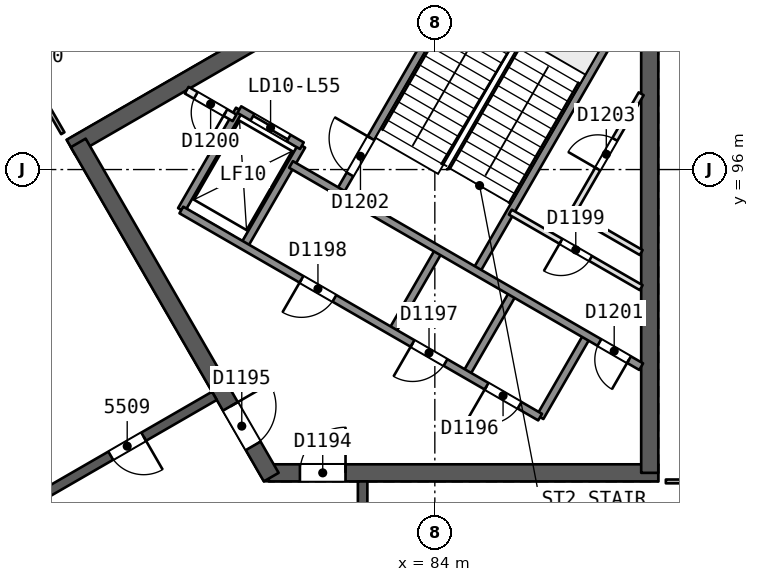
"""IFC4 building model, lengths in metres.
Left out: names, types, materials, properties, quantities, classifications, styles, units other than length and angle.
Written with IfcOpenShell. Run it as: python <this file> out.ifc"""

import sys

from ifc_helpers import new_model, si_unit, direction, frame, frame_2d, origin, place, context, subcontext, project, spatial, rectangle, extrude, element, fill, save


model = new_model("IFC4")
c1 = context("Model", 3, precision=1e-05, world=origin(), true_north=direction((0.0, 1.0)))
c2 = subcontext(c1, "Body", "Model", "MODEL_VIEW")
j1 = project(units=[si_unit("LENGTHUNIT", "METRE"), si_unit("PLANEANGLEUNIT", "RADIAN")], contexts=[c1])
p1 = place(None, origin())
s1 = spatial("IfcSite", under=j1, at=p1, CompositionType="ELEMENT")
p2 = place(p1, origin())
s2 = spatial("IfcBuilding", under=s1, at=p2, CompositionType="ELEMENT")
p3 = place(p2, frame((0.0, 0.0, 224.3)))
s3 = spatial("IfcBuildingStorey", under=s2, at=p3, CompositionType="ELEMENT", Elevation=224.3)
p4 = place(p3, frame((79.63, 88.019, 0.0), z_axis=(0.0, 0.0, 1.0), x_axis=(1.0, 0.0, 0.0)))
e1 = element("IfcWall", 1, at=p4, inside=s3, PredefinedType="SHEAR", context=c2, shape_type="SweptSolid", body=[
    extrude(rectangle(XDim=10.25, YDim=0.45, at=frame_2d((5.125, 0.0))), origin(), (0.0, 0.0, 1.0), 3.7),
])
p5 = place(p4, frame((0.82, 0.0, 0.0)))
e2 = element("IfcOpeningElement", 2, at=p5, cuts=e1, PredefinedType="OPENING", context=c2, shape_type="SweptSolid", body=[
    extrude(rectangle(XDim=1.2, YDim=2.1, at=frame_2d((0.6, 1.05))), frame((0.0, 0.235, 0.0), z_axis=(0.0, -1.0, 0.0), x_axis=(1.0, 0.0, 0.0)), (0.0, 0.0, 1.0), 0.471),
])
p6 = place(p3, frame((89.655, 88.019, 0.0), z_axis=(0.0, 0.0, 1.0), x_axis=(0.0, 1.0, 0.0)))
e3 = element("IfcWall", 3, at=p6, inside=s3, PredefinedType="SHEAR", context=c2, shape_type="SweptSolid", body=[
    extrude(rectangle(XDim=14.108, YDim=0.45, at=frame_2d((7.054, 0.0))), origin(), (0.0, 0.0, 1.0), 3.7),
])
p7 = place(p3, frame((86.723, 103.69, 0.0), z_axis=(0.0, 0.0, 1.0), x_axis=(-0.866022713978, -0.500004658852, 0.0)))
e4 = element("IfcWall", 4, at=p7, inside=s3, PredefinedType="SHEAR", context=c2, shape_type="SweptSolid", body=[
    extrude(rectangle(XDim=14.203, YDim=0.45, at=frame_2d((7.102, 0.0))), origin(), (0.0, 0.0, 1.0), 3.7),
])
p8 = place(p3, frame((74.617, 96.701, 0.0), z_axis=(0.0, 0.0, 1.0), x_axis=(0.499994385119, -0.866028645513, 0.0)))
e5 = element("IfcWall", 5, at=p8, inside=s3, PredefinedType="SHEAR", context=c2, shape_type="SweptSolid", body=[
    extrude(rectangle(XDim=10.155, YDim=0.45, at=frame_2d((5.077, 0.0))), origin(), (0.0, 0.0, 1.0), 3.7),
])
p9 = place(p8, frame((8.005, 0.0, 0.0)))
e6 = element("IfcOpeningElement", 6, at=p9, cuts=e5, PredefinedType="OPENING", context=c2, shape_type="SweptSolid", body=[
    extrude(rectangle(XDim=1.2, YDim=2.1, at=frame_2d((0.6, 1.05))), frame((0.0, 0.235, 0.0), z_axis=(0.0, -1.0, 0.0), x_axis=(1.0, 0.0, 0.0)), (0.0, 0.0, 1.0), 0.471),
])
p10 = place(p3, frame((82.1, 72.206, 0.0), z_axis=(0.0, 0.0, 1.0), x_axis=(0.0, 1.0, 0.0)))
e7 = element("IfcWall", 7, at=p10, inside=s3, PredefinedType="SHEAR", context=c2, shape_type="SweptSolid", body=[
    extrude(rectangle(XDim=15.588, YDim=0.25, at=frame_2d((7.794, 0.0))), origin(), (0.0, 0.0, 1.0), 3.3),
])
p11 = place(p10, frame((2.15, 0.0, 0.0)))
e8 = element("IfcOpeningElement", 8, at=p11, cuts=e7, PredefinedType="OPENING", context=c2, shape_type="SweptSolid", body=[
    extrude(rectangle(XDim=1.0, YDim=2.1, at=frame_2d((0.5, 1.05))), frame((0.0, 0.135, 0.0), z_axis=(0.0, -1.0, 0.0), x_axis=(1.0, 0.0, 0.0)), (0.0, 0.0, 1.0), 0.271),
])
p12 = place(p10, frame((8.75, 0.0, 0.0)))
e9 = element("IfcOpeningElement", 9, at=p12, cuts=e7, PredefinedType="OPENING", context=c2, shape_type="SweptSolid", body=[
    extrude(rectangle(XDim=1.0, YDim=2.1, at=frame_2d((0.5, 1.05))), frame((0.0, 0.135, 0.0), z_axis=(0.0, -1.0, 0.0), x_axis=(1.0, 0.0, 0.0)), (0.0, 0.0, 1.0), 0.271),
])
p13 = place(p10, frame((12.594, 0.0, 0.0)))
e10 = element("IfcOpeningElement", 10, at=p13, cuts=e7, PredefinedType="OPENING", context=c2, shape_type="SweptSolid", body=[
    extrude(rectangle(XDim=1.0, YDim=2.1, at=frame_2d((0.5, 1.05))), frame((0.0, 0.135, 0.0), z_axis=(0.0, -1.0, 0.0), x_axis=(1.0, 0.0, 0.0)), (0.0, 0.0, 1.0), 0.271),
])
p14 = place(p3, frame((78.2, 90.046, 0.0), z_axis=(0.0, 0.0, 1.0), x_axis=(-0.866026492143, -0.499998114903, 0.0)))
e11 = element("IfcWall", 11, at=p14, inside=s3, PredefinedType="SHEAR", context=c2, shape_type="SweptSolid", body=[
    extrude(rectangle(XDim=15.588, YDim=0.25, at=frame_2d((7.794, 0.0))), origin(), (0.0, 0.0, 1.0), 3.3),
])
p15 = place(p14, frame((2.15, 0.0, 0.0)))
e12 = element("IfcOpeningElement", 12, at=p15, cuts=e11, PredefinedType="OPENING", context=c2, shape_type="SweptSolid", body=[
    extrude(rectangle(XDim=1.0, YDim=2.1, at=frame_2d((0.5, 1.05))), frame((0.0, 0.135, 0.0), z_axis=(0.0, -1.0, 0.0), x_axis=(1.0, 0.0, 0.0)), (0.0, 0.0, 1.0), 0.271),
])
p16 = place(p14, frame((8.538, 0.0, 0.0)))
e13 = element("IfcOpeningElement", 13, at=p16, cuts=e11, PredefinedType="OPENING", context=c2, shape_type="SweptSolid", body=[
    extrude(rectangle(XDim=1.1, YDim=2.1, at=frame_2d((0.55, 1.05))), frame((0.0, 0.135, 0.0), z_axis=(0.0, -1.0, 0.0), x_axis=(1.0, 0.0, 0.0)), (0.0, 0.0, 1.0), 0.271),
])
p17 = place(p14, frame((12.282, 0.0, 0.0)))
e14 = element("IfcOpeningElement", 14, at=p17, cuts=e11, PredefinedType="OPENING", context=c2, shape_type="SweptSolid", body=[
    extrude(rectangle(XDim=1.0, YDim=2.1, at=frame_2d((0.5, 1.05))), frame((0.0, 0.135, 0.0), z_axis=(0.0, -1.0, 0.0), x_axis=(1.0, 0.0, 0.0)), (0.0, 0.0, 1.0), 0.271),
])
p18 = place(p3, frame((92.428, 87.794, 0.0), z_axis=(0.0, 0.0, 1.0), x_axis=(-1.0, 0.0, 0.0)))
e15 = element("IfcWall", 15, at=p18, inside=s3, PredefinedType="PARTITIONING", context=c2, shape_type="SweptSolid", body=[
    extrude(rectangle(XDim=2.349, YDim=0.1, at=frame_2d((1.175, 0.0))), origin(), (0.0, 0.0, 1.0), 3.3),
])
p19 = place(p18, frame((0.725, 0.0, 0.0)))
e16 = element("IfcOpeningElement", 16, at=p19, cuts=e15, PredefinedType="OPENING", context=c2, shape_type="SweptSolid", body=[
    extrude(rectangle(XDim=0.9, YDim=2.1, at=frame_2d((0.45, 1.05))), frame((0.0, 0.061, 0.0), z_axis=(0.0, -1.0, 0.0), x_axis=(1.0, 0.0, 0.0)), (0.0, 0.0, 1.0), 0.121),
])
p20 = place(p3, frame((74.21, 96.956, 0.0), z_axis=(0.0, 0.0, 1.0), x_axis=(-0.499950341091, 0.86605407247, 0.0)))
e17 = element("IfcWall", 17, at=p20, inside=s3, PredefinedType="PARTITIONING", context=c2, shape_type="SweptSolid", body=[
    extrude(rectangle(XDim=2.349, YDim=0.1, at=frame_2d((1.175, 0.0))), origin(), (0.0, 0.0, 1.0), 3.3),
])
p21 = place(p20, frame((0.725, 0.0, 0.0)))
e18 = element("IfcOpeningElement", 18, at=p21, cuts=e17, PredefinedType="OPENING", context=c2, shape_type="SweptSolid", body=[
    extrude(rectangle(XDim=0.9, YDim=2.1, at=frame_2d((0.45, 1.05))), frame((0.0, 0.061, 0.0), z_axis=(0.0, -1.0, 0.0), x_axis=(1.0, 0.0, 0.0)), (0.0, 0.0, 1.0), 0.121),
])
p22 = place(p3, frame((44.324, 82.585, 0.0), z_axis=(0.0, 0.0, 1.0), x_axis=(0.86602584856, 0.499999229625, 0.0)))
e19 = element("IfcWall", 19, at=p22, inside=s3, PredefinedType="SOLIDWALL", context=c2, shape_type="SweptSolid", body=[
    extrude(rectangle(XDim=50.547, YDim=0.3, at=frame_2d((25.274, 0.0))), origin(), (0.0, 0.0, 1.0), 3.3),
])
p23 = place(p22, frame((24.23, 0.0, 0.0)))
e20 = element("IfcOpeningElement", 20, at=p23, cuts=e19, PredefinedType="OPENING", context=c2, shape_type="SweptSolid", body=[
    extrude(rectangle(XDim=2.4, YDim=2.4, at=frame_2d((1.2, 1.2))), frame((0.0, 0.161, 0.0), z_axis=(0.0, -1.0, 0.0), x_axis=(1.0, 0.0, 0.0)), (0.0, 0.0, 1.0), 0.321),
])
p24 = place(p22, frame((29.218, 0.0, 0.0)))
e21 = element("IfcOpeningElement", 21, at=p24, cuts=e19, PredefinedType="OPENING", context=c2, shape_type="SweptSolid", body=[
    extrude(rectangle(XDim=2.4, YDim=2.4, at=frame_2d((1.2, 1.2))), frame((0.0, 0.161, 0.0), z_axis=(0.0, -1.0, 0.0), x_axis=(1.0, 0.0, 0.0)), (0.0, 0.0, 1.0), 0.321),
])
p25 = place(p22, frame((39.328, 0.0, 0.0)))
e22 = element("IfcOpeningElement", 22, at=p25, cuts=e19, PredefinedType="OPENING", context=c2, shape_type="SweptSolid", body=[
    extrude(rectangle(XDim=2.4, YDim=2.4, at=frame_2d((1.2, 1.2))), frame((0.0, 0.161, 0.0), z_axis=(0.0, -1.0, 0.0), x_axis=(1.0, 0.0, 0.0)), (0.0, 0.0, 1.0), 0.321),
])
p26 = place(p22, frame((19.085, 0.0, 0.0)))
e23 = element("IfcOpeningElement", 23, at=p26, cuts=e19, PredefinedType="OPENING", context=c2, shape_type="SweptSolid", body=[
    extrude(rectangle(XDim=2.4, YDim=2.4, at=frame_2d((1.2, 1.2))), frame((0.0, 0.161, 0.0), z_axis=(0.0, -1.0, 0.0), x_axis=(1.0, 0.0, 0.0)), (0.0, 0.0, 1.0), 0.321),
])
p27 = place(p22, frame((8.771, 0.0, 0.0)))
e24 = element("IfcOpeningElement", 24, at=p27, cuts=e19, PredefinedType="OPENING", context=c2, shape_type="SweptSolid", body=[
    extrude(rectangle(XDim=2.4, YDim=2.4, at=frame_2d((1.2, 1.2))), frame((0.0, 0.161, 0.0), z_axis=(0.0, -1.0, 0.0), x_axis=(1.0, 0.0, 0.0)), (0.0, 0.0, 1.0), 0.321),
])
p28 = place(p3, frame((86.77, 89.486, 0.0), z_axis=(0.0, 0.0, 1.0), x_axis=(0.499961042966, 0.86604789447, 0.0)))
e25 = element("IfcWall", 25, at=p28, inside=s3, PredefinedType="SOLIDWALL", context=c2, shape_type="SweptSolid", body=[
    extrude(rectangle(XDim=2.48, YDim=0.2, at=frame_2d((1.24, 0.0))), origin(), (0.0, 0.0, 1.0), 3.3),
])
p29 = place(p3, frame((87.621, 94.86, 0.0), z_axis=(0.0, 0.0, 1.0), x_axis=(0.499993116331, 0.866029378036, 0.0)))
e26 = element("IfcWall", 26, at=p29, inside=s3, PredefinedType="PARTITIONING", context=c2, shape_type="SweptSolid", body=[
    extrude(rectangle(XDim=3.618, YDim=0.15, at=frame_2d((1.809, 0.0))), origin(), (0.0, 0.0, 1.0), 3.3),
])
p30 = place(p29, frame((1.332, 0.0, 0.0)))
e27 = element("IfcOpeningElement", 27, at=p30, cuts=e26, PredefinedType="OPENING", context=c2, shape_type="SweptSolid", body=[
    extrude(rectangle(XDim=0.9, YDim=2.1, at=frame_2d((0.45, 1.05))), frame((0.0, 0.085, 0.0), z_axis=(0.0, -1.0, 0.0), x_axis=(1.0, 0.0, 0.0)), (0.0, 0.0, 1.0), 0.171),
])
p31 = place(p3, frame((84.821, 90.611, 0.0), z_axis=(0.0, 0.0, 1.0), x_axis=(0.499961042966, 0.86604789447, 0.0)))
e28 = element("IfcWall", 28, at=p31, inside=s3, PredefinedType="SOLIDWALL", context=c2, shape_type="SweptSolid", body=[
    extrude(rectangle(XDim=2.48, YDim=0.2, at=frame_2d((1.24, 0.0))), origin(), (0.0, 0.0, 1.0), 3.3),
])
p32 = place(p3, frame((85.087, 93.321, 0.0), z_axis=(0.0, 0.0, 1.0), x_axis=(0.500019787375, 0.866013979237, 0.0)))
e29 = element("IfcWall", 29, at=p32, inside=s3, PredefinedType="SOLIDWALL", context=c2, shape_type="SweptSolid", body=[
    extrude(rectangle(XDim=7.7, YDim=0.2, at=frame_2d((3.85, 0.0))), origin(), (0.0, 0.0, 1.0), 3.3),
])
p33 = place(p3, frame((82.873, 91.736, 0.0), z_axis=(0.0, 0.0, 1.0), x_axis=(0.499961042966, 0.86604789447, 0.0)))
e30 = element("IfcWall", 30, at=p33, inside=s3, PredefinedType="SOLIDWALL", context=c2, shape_type="SweptSolid", body=[
    extrude(rectangle(XDim=2.48, YDim=0.2, at=frame_2d((1.24, 0.0))), origin(), (0.0, 0.0, 1.0), 3.3),
])
p34 = place(p3, frame((81.493, 95.396, 0.0), z_axis=(0.0, 0.0, 1.0), x_axis=(0.500006057782, 0.866021906294, 0.0)))
e31 = element("IfcWall", 31, at=p34, inside=s3, PredefinedType="SOLIDWALL", context=c2, shape_type="SweptSolid", body=[
    extrude(rectangle(XDim=7.7, YDim=0.2, at=frame_2d((3.85, 0.0))), origin(), (0.0, 0.0, 1.0), 3.3),
])
p35 = place(p34, frame((0.55, 0.0, 0.0)))
e32 = element("IfcOpeningElement", 32, at=p35, cuts=e31, PredefinedType="OPENING", context=c2, shape_type="SweptSolid", body=[
    extrude(rectangle(XDim=1.1, YDim=2.1, at=frame_2d((0.55, 1.05))), frame((0.0, 0.11, 0.0), z_axis=(0.0, -1.0, 0.0), x_axis=(1.0, 0.0, 0.0)), (0.0, 0.0, 1.0), 0.221),
])
for number, where, z_axis, x_axis in (
    (33, (78.976, 93.986, 0.0), (0.0, 0.0, 1.0), (0.5, 0.866, 0.0)),
    (34, (77.33, 94.936, 0.0), (0.0, 0.0, 1.0), (0.5, 0.866, 0.0)),
):
    element("IfcWall", number, at=place(p3, frame(where, z_axis=z_axis, x_axis=x_axis)), inside=s3, PredefinedType="SOLIDWALL", context=c2, shape_type="SweptSolid", body=[
        extrude(rectangle(XDim=3.05, YDim=0.2, at=frame_2d((1.525, 0.0))), origin(), (0.0, 0.0, 1.0), 3.3),
    ])
p36 = place(p3, frame((86.77, 89.486, 0.0), z_axis=(0.0, 0.0, 1.0), x_axis=(-0.86601811187, 0.500012629753, 0.0)))
e35 = element("IfcWall", 35, at=p36, inside=s3, PredefinedType="SOLIDWALL", context=c2, shape_type="SweptSolid", body=[
    extrude(rectangle(XDim=10.9, YDim=0.2, at=frame_2d((5.45, 0.0))), origin(), (0.0, 0.0, 1.0), 3.3),
])
p37 = place(p36, frame((0.625, 0.0, 0.0)))
e36 = element("IfcOpeningElement", 36, at=p37, cuts=e35, PredefinedType="OPENING", context=c2, shape_type="SweptSolid", body=[
    extrude(rectangle(XDim=1.0, YDim=2.1, at=frame_2d((0.5, 1.05))), frame((0.0, 0.11, 0.0), z_axis=(0.0, -1.0, 0.0), x_axis=(1.0, 0.0, 0.0)), (0.0, 0.0, 1.0), 0.221),
])
p38 = place(p36, frame((2.875, 0.0, 0.0)))
e37 = element("IfcOpeningElement", 37, at=p38, cuts=e35, PredefinedType="OPENING", context=c2, shape_type="SweptSolid", body=[
    extrude(rectangle(XDim=1.0, YDim=2.1, at=frame_2d((0.5, 1.05))), frame((0.0, 0.11, 0.0), z_axis=(0.0, -1.0, 0.0), x_axis=(1.0, 0.0, 0.0)), (0.0, 0.0, 1.0), 0.221),
])
p39 = place(p36, frame((6.25, 0.0, 0.0)))
e38 = element("IfcOpeningElement", 38, at=p39, cuts=e35, PredefinedType="OPENING", context=c2, shape_type="SweptSolid", body=[
    extrude(rectangle(XDim=1.0, YDim=2.1, at=frame_2d((0.5, 1.05))), frame((0.0, 0.11, 0.0), z_axis=(0.0, -1.0, 0.0), x_axis=(1.0, 0.0, 0.0)), (0.0, 0.0, 1.0), 0.221),
])
p40 = place(p3, frame((89.43, 90.814, 0.0), z_axis=(0.0, 0.0, 1.0), x_axis=(-0.866018983788, 0.500011119594, 0.0)))
e39 = element("IfcWall", 39, at=p40, inside=s3, PredefinedType="SOLIDWALL", context=c2, shape_type="SweptSolid", body=[
    extrude(rectangle(XDim=10.64, YDim=0.2, at=frame_2d((5.32, 0.0))), origin(), (0.0, 0.0, 1.0), 3.3),
])
p41 = place(p40, frame((0.37, 0.0, 0.0)))
e40 = element("IfcOpeningElement", 40, at=p41, cuts=e39, PredefinedType="OPENING", context=c2, shape_type="SweptSolid", body=[
    extrude(rectangle(XDim=0.9, YDim=2.1, at=frame_2d((0.45, 1.05))), frame((0.0, 0.11, 0.0), z_axis=(0.0, -1.0, 0.0), x_axis=(1.0, 0.0, 0.0)), (0.0, 0.0, 1.0), 0.221),
])
p42 = place(p3, frame((78.73, 97.361, 0.0), z_axis=(0.0, 0.0, 1.0), x_axis=(-0.866045896294, 0.499964504253, 0.0)))
e41 = element("IfcWall", 41, at=p42, inside=s3, PredefinedType="PARTITIONING", context=c2, shape_type="SweptSolid", body=[
    extrude(rectangle(XDim=1.455, YDim=0.2, at=frame_2d((0.728, 0.0))), origin(), (0.0, 0.0, 1.0), 3.3),
])
p43 = place(p42, frame((0.278, 0.0, 0.0)))
e42 = element("IfcOpeningElement", 42, at=p43, cuts=e41, PredefinedType="OPENING", context=c2, shape_type="SweptSolid", body=[
    extrude(rectangle(XDim=0.9, YDim=2.1, at=frame_2d((0.45, 1.05))), frame((0.0, 0.11, 0.0), z_axis=(0.0, -1.0, 0.0), x_axis=(1.0, 0.0, 0.0)), (0.0, 0.0, 1.0), 0.221),
])
p44 = place(p3, frame((80.5, 96.627, 0.0), z_axis=(0.0, 0.0, 1.0), x_axis=(-0.86601224135, 0.500022797313, 0.0)))
e43 = element("IfcWall", 43, at=p44, inside=s3, PredefinedType="SOLIDWALL", context=c2, shape_type="SweptSolid", body=[
    extrude(rectangle(XDim=1.9, YDim=0.2, at=frame_2d((0.95, 0.0))), origin(), (0.0, 0.0, 1.0), 3.3),
])
p45 = place(p44, frame((0.4, 0.0, 0.0)))
e44 = element("IfcOpeningElement", 44, at=p45, cuts=e43, PredefinedType="OPENING", context=c2, shape_type="SweptSolid", body=[
    extrude(rectangle(XDim=1.1, YDim=2.1, at=frame_2d((0.55, 1.05))), frame((0.0, 0.11, 0.0), z_axis=(0.0, -1.0, 0.0), x_axis=(1.0, 0.0, 0.0)), (0.0, 0.0, 1.0), 0.221),
])
p46 = place(p3, frame((89.43, 92.892, 0.0), z_axis=(0.0, 0.0, 1.0), x_axis=(-0.866019912421, 0.500009511199, 0.0)))
e45 = element("IfcWall", 45, at=p46, inside=s3, PredefinedType="PARTITIONING", context=c2, shape_type="SweptSolid", body=[
    extrude(rectangle(XDim=3.976, YDim=0.15, at=frame_2d((1.988, 0.0))), origin(), (0.0, 0.0, 1.0), 3.3),
])
p47 = place(p46, frame((1.538, 0.0, 0.0)))
e46 = element("IfcOpeningElement", 46, at=p47, cuts=e45, PredefinedType="OPENING", context=c2, shape_type="SweptSolid", body=[
    extrude(rectangle(XDim=0.9, YDim=2.1, at=frame_2d((0.45, 1.05))), frame((0.0, 0.085, 0.0), z_axis=(0.0, -1.0, 0.0), x_axis=(1.0, 0.0, 0.0)), (0.0, 0.0, 1.0), 0.171),
])
p48 = place(p3, frame((89.43, 93.816, 0.0), z_axis=(0.0, 0.0, 1.0), x_axis=(-0.866004557827, 0.500036104519, 0.0)))
e47 = element("IfcWall", 47, at=p48, inside=s3, PredefinedType="PARTITIONING", context=c2, shape_type="SweptSolid", body=[
    extrude(rectangle(XDim=2.089, YDim=0.15, at=frame_2d((1.044, 0.0))), origin(), (0.0, 0.0, 1.0), 3.3),
])
p49 = place(p15, origin())
e48 = element("IfcDoor", 48, at=p49, inside=s3, OperationType="SINGLE_SWING_LEFT", PredefinedType="NOTDEFINED", context=c2, shape_type="SweptSolid", body=[
    extrude(rectangle(XDim=1.0, YDim=2.1, at=frame_2d((0.5, 1.05))), frame((0.0, 0.025, 0.0), z_axis=(0.0, -1.0, 0.0), x_axis=(1.0, 0.0, 0.0)), (0.0, 0.0, 1.0), 0.05),
])
fill(e12, e48)
p50 = place(p5, origin())
e49 = element("IfcDoor", 49, at=p50, inside=s3, OperationType="SINGLE_SWING_RIGHT", PredefinedType="NOTDEFINED", context=c2, shape_type="SweptSolid", body=[
    extrude(rectangle(XDim=1.2, YDim=2.1, at=frame_2d((0.6, 1.05))), frame((0.0, 0.025, 0.0), z_axis=(0.0, -1.0, 0.0), x_axis=(1.0, 0.0, 0.0)), (0.0, 0.0, 1.0), 0.05),
])
fill(e2, e49)
p51 = place(p9, origin())
e50 = element("IfcDoor", 50, at=p51, inside=s3, OperationType="SINGLE_SWING_LEFT", PredefinedType="NOTDEFINED", context=c2, shape_type="SweptSolid", body=[
    extrude(rectangle(XDim=1.2, YDim=2.1, at=frame_2d((0.6, 1.05))), frame((0.0, 0.025, 0.0), z_axis=(0.0, -1.0, 0.0), x_axis=(1.0, 0.0, 0.0)), (0.0, 0.0, 1.0), 0.05),
])
fill(e6, e50)
p52 = place(p45, origin())
e51 = element("IfcDoor", 51, at=p52, inside=s3, OperationType="SLIDING_TO_RIGHT", PredefinedType="NOTDEFINED", context=c2, shape_type="SweptSolid", body=[
    extrude(rectangle(XDim=1.1, YDim=2.1, at=frame_2d((0.55, 1.05))), frame((0.0, 0.025, 0.0), z_axis=(0.0, -1.0, 0.0), x_axis=(1.0, 0.0, 0.0)), (0.0, 0.0, 1.0), 0.05),
])
fill(e44, e51)
p53 = place(p37, origin())
e52 = element("IfcDoor", 52, at=p53, inside=s3, OperationType="SINGLE_SWING_RIGHT", PredefinedType="NOTDEFINED", context=c2, shape_type="SweptSolid", body=[
    extrude(rectangle(XDim=1.0, YDim=2.1, at=frame_2d((0.5, 1.05))), frame((0.0, 0.025, 0.0), z_axis=(0.0, -1.0, 0.0), x_axis=(1.0, 0.0, 0.0)), (0.0, 0.0, 1.0), 0.05),
])
fill(e36, e52)
p54 = place(p38, origin())
e53 = element("IfcDoor", 53, at=p54, inside=s3, OperationType="SINGLE_SWING_RIGHT", PredefinedType="NOTDEFINED", context=c2, shape_type="SweptSolid", body=[
    extrude(rectangle(XDim=1.0, YDim=2.1, at=frame_2d((0.5, 1.05))), frame((0.0, 0.025, 0.0), z_axis=(0.0, -1.0, 0.0), x_axis=(1.0, 0.0, 0.0)), (0.0, 0.0, 1.0), 0.05),
])
fill(e37, e53)
p55 = place(p39, origin())
e54 = element("IfcDoor", 54, at=p55, inside=s3, OperationType="SINGLE_SWING_RIGHT", PredefinedType="NOTDEFINED", context=c2, shape_type="SweptSolid", body=[
    extrude(rectangle(XDim=1.0, YDim=2.1, at=frame_2d((0.5, 1.05))), frame((0.0, 0.025, 0.0), z_axis=(0.0, -1.0, 0.0), x_axis=(1.0, 0.0, 0.0)), (0.0, 0.0, 1.0), 0.05),
])
fill(e38, e54)
p56 = place(p47, origin())
e55 = element("IfcDoor", 55, at=p56, inside=s3, OperationType="SINGLE_SWING_RIGHT", PredefinedType="NOTDEFINED", context=c2, shape_type="SweptSolid", body=[
    extrude(rectangle(XDim=0.9, YDim=2.1, at=frame_2d((0.45, 1.05))), frame((0.0, 0.025, 0.0), z_axis=(0.0, -1.0, 0.0), x_axis=(1.0, 0.0, 0.0)), (0.0, 0.0, 1.0), 0.05),
])
fill(e46, e55)
p57 = place(p43, origin())
e56 = element("IfcDoor", 56, at=p57, inside=s3, OperationType="SINGLE_SWING_LEFT", PredefinedType="NOTDEFINED", context=c2, shape_type="SweptSolid", body=[
    extrude(rectangle(XDim=0.9, YDim=2.1, at=frame_2d((0.45, 1.05))), frame((0.0, 0.025, 0.0), z_axis=(0.0, -1.0, 0.0), x_axis=(1.0, 0.0, 0.0)), (0.0, 0.0, 1.0), 0.05),
])
fill(e42, e56)
p58 = place(p41, origin())
e57 = element("IfcDoor", 57, at=p58, inside=s3, OperationType="SINGLE_SWING_LEFT", PredefinedType="NOTDEFINED", context=c2, shape_type="SweptSolid", body=[
    extrude(rectangle(XDim=0.9, YDim=2.1, at=frame_2d((0.45, 1.05))), frame((0.0, 0.025, 0.0), z_axis=(0.0, -1.0, 0.0), x_axis=(1.0, 0.0, 0.0)), (0.0, 0.0, 1.0), 0.05),
])
fill(e40, e57)
p59 = place(p35, origin())
e58 = element("IfcDoor", 58, at=p59, inside=s3, OperationType="SINGLE_SWING_RIGHT", PredefinedType="NOTDEFINED", context=c2, shape_type="SweptSolid", body=[
    extrude(rectangle(XDim=1.1, YDim=2.1, at=frame_2d((0.55, 1.05))), frame((0.0, 0.025, 0.0), z_axis=(0.0, -1.0, 0.0), x_axis=(1.0, 0.0, 0.0)), (0.0, 0.0, 1.0), 0.05),
])
fill(e32, e58)
p60 = place(p30, origin())
e59 = element("IfcDoor", 59, at=p60, inside=s3, OperationType="SINGLE_SWING_LEFT", PredefinedType="NOTDEFINED", context=c2, shape_type="SweptSolid", body=[
    extrude(rectangle(XDim=0.9, YDim=2.1, at=frame_2d((0.45, 1.05))), frame((0.0, 0.025, 0.0), z_axis=(0.0, -1.0, 0.0), x_axis=(1.0, 0.0, 0.0)), (0.0, 0.0, 1.0), 0.05),
])
fill(e27, e59)
save(model, sys.argv[1])
